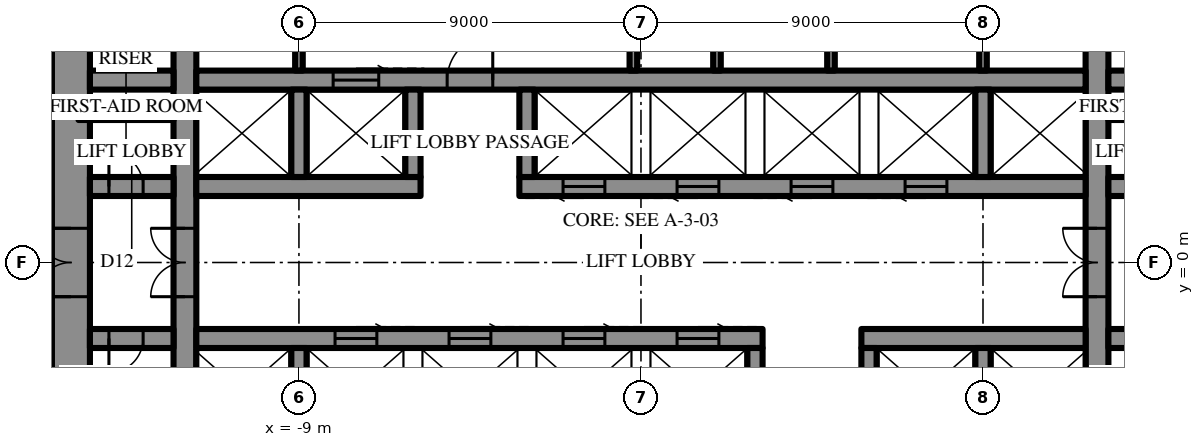
"""IFC4 building model, lengths in metres.
Left out: names, types, materials, properties, quantities, classifications, styles, units other than length and angle.
Written with IfcOpenShell. Run it as: python <this file> out.ifc"""

import sys

from ifc_helpers import new_model, si_unit, direction, frame, frame_2d, origin, place, context, subcontext, project, spatial, rectangle, extrude, element, fill, save


model = new_model("IFC4")
c1 = context("Model", 3, precision=1e-05, world=origin(), true_north=direction((0.0, 1.0)))
c2 = subcontext(c1, "Body", "Model", "MODEL_VIEW")
j1 = project(units=[si_unit("LENGTHUNIT", "METRE"), si_unit("PLANEANGLEUNIT", "RADIAN")], contexts=[c1])
p1 = place(None, origin())
s1 = spatial("IfcSite", under=j1, at=p1, CompositionType="ELEMENT")
p2 = place(p1, origin())
s2 = spatial("IfcBuilding", under=s1, at=p2, CompositionType="ELEMENT")
p3 = place(p2, frame((0.0, 0.0, 215.5)))
s3 = spatial("IfcBuildingStorey", under=s2, at=p3, CompositionType="ELEMENT", Elevation=215.5)
p4 = place(p3, frame((-15.0, 10.7, 0.0), z_axis=(0.0, 0.0, 1.0), x_axis=(0.0, -1.0, 0.0)))
e1 = element("IfcWall", 1, at=p4, inside=s3, PredefinedType="SHEAR", context=c2, shape_type="SweptSolid", body=[
    extrude(rectangle(XDim=21.4, YDim=1.0, at=frame_2d((10.7, 0.0))), origin(), (0.0, 0.0, 1.0), 4.2),
])
p5 = place(p4, frame((9.8, 0.0, 0.0)))
e2 = element("IfcOpeningElement", 2, at=p5, cuts=e1, PredefinedType="OPENING", context=c2, shape_type="SweptSolid", body=[
    extrude(rectangle(XDim=1.8, YDim=2.4, at=frame_2d((0.9, 1.2))), frame((0.0, 0.51, 0.0), z_axis=(0.0, -1.0, 0.0), x_axis=(1.0, 0.0, 0.0)), (0.0, 0.0, 1.0), 1.02),
])
p6 = place(p3, frame((12.0, -10.7, 0.0), z_axis=(0.0, 0.0, 1.0), x_axis=(0.0, 1.0, 0.0)))
e3 = element("IfcWall", 3, at=p6, inside=s3, PredefinedType="SHEAR", context=c2, shape_type="SweptSolid", body=[
    extrude(rectangle(XDim=21.4, YDim=0.6, at=frame_2d((10.7, 0.0))), origin(), (0.0, 0.0, 1.0), 4.2),
])
p7 = place(p6, frame((9.8, 0.0, 0.0)))
e4 = element("IfcOpeningElement", 4, at=p7, cuts=e3, PredefinedType="OPENING", context=c2, shape_type="SweptSolid", body=[
    extrude(rectangle(XDim=1.8, YDim=2.4, at=frame_2d((0.9, 1.2))), frame((0.0, 0.31, 0.0), z_axis=(0.0, -1.0, 0.0), x_axis=(1.0, 0.0, 0.0)), (0.0, 0.0, 1.0), 0.62),
])
p8 = place(p3, frame((-12.0, -10.7, 0.0), z_axis=(0.0, 0.0, 1.0), x_axis=(0.0, 1.0, 0.0)))
e5 = element("IfcWall", 5, at=p8, inside=s3, PredefinedType="SHEAR", context=c2, shape_type="SweptSolid", body=[
    extrude(rectangle(XDim=21.4, YDim=0.6, at=frame_2d((10.7, 0.0))), origin(), (0.0, 0.0, 1.0), 4.2),
])
p9 = place(p8, frame((9.8, 0.0, 0.0)))
e6 = element("IfcOpeningElement", 6, at=p9, cuts=e5, PredefinedType="OPENING", context=c2, shape_type="SweptSolid", body=[
    extrude(rectangle(XDim=1.8, YDim=2.4, at=frame_2d((0.9, 1.2))), frame((0.0, 0.31, 0.0), z_axis=(0.0, -1.0, 0.0), x_axis=(1.0, 0.0, 0.0)), (0.0, 0.0, 1.0), 0.62),
])
p10 = place(p3, frame((-14.5, 2.0, 0.0), z_axis=(0.0, 0.0, 1.0), x_axis=(1.0, 0.0, 0.0)))
e7 = element("IfcWall", 7, at=p10, inside=s3, PredefinedType="SHEAR", context=c2, shape_type="SweptSolid", body=[
    extrude(rectangle(XDim=2.2, YDim=0.5, at=frame_2d((1.1, 0.0))), origin(), (0.0, 0.0, 1.0), 4.2),
])
p11 = place(p10, frame((0.5, 0.0, 0.0)))
e8 = element("IfcOpeningElement", 8, at=p11, cuts=e7, PredefinedType="OPENING", context=c2, shape_type="SweptSolid", body=[
    extrude(rectangle(XDim=0.9, YDim=2.2, at=frame_2d((0.45, 1.1))), frame((0.0, 0.26, 0.0), z_axis=(0.0, -1.0, 0.0), x_axis=(1.0, 0.0, 0.0)), (0.0, 0.0, 1.0), 0.52),
])
p12 = place(p3, frame((-11.7, 2.0, 0.0), z_axis=(0.0, 0.0, 1.0), x_axis=(1.0, 0.0, 0.0)))
e9 = element("IfcWall", 9, at=p12, inside=s3, PredefinedType="SHEAR", context=c2, shape_type="SweptSolid", body=[
    extrude(rectangle(XDim=5.9, YDim=0.5, at=frame_2d((2.95, 0.0))), origin(), (0.0, 0.0, 1.0), 4.2),
])
p13 = place(p3, frame((-3.2, 2.0, 0.0), z_axis=(0.0, 0.0, 1.0), x_axis=(1.0, 0.0, 0.0)))
e10 = element("IfcWall", 10, at=p13, inside=s3, PredefinedType="SHEAR", context=c2, shape_type="SweptSolid", body=[
    extrude(rectangle(XDim=14.9, YDim=0.5, at=frame_2d((7.45, 0.0))), origin(), (0.0, 0.0, 1.0), 4.2),
])
p14 = place(p13, frame((1.15, 0.0, 0.0)))
e11 = element("IfcOpeningElement", 11, at=p14, cuts=e10, PredefinedType="OPENING", context=c2, shape_type="SweptSolid", body=[
    extrude(rectangle(XDim=1.1, YDim=2.2, at=frame_2d((0.55, 1.1))), frame((0.0, 0.26, 0.0), z_axis=(0.0, -1.0, 0.0), x_axis=(1.0, 0.0, 0.0)), (0.0, 0.0, 1.0), 0.52),
])
p15 = place(p13, frame((4.15, 0.0, 0.0)))
e12 = element("IfcOpeningElement", 12, at=p15, cuts=e10, PredefinedType="OPENING", context=c2, shape_type="SweptSolid", body=[
    extrude(rectangle(XDim=1.1, YDim=2.2, at=frame_2d((0.55, 1.1))), frame((0.0, 0.26, 0.0), z_axis=(0.0, -1.0, 0.0), x_axis=(1.0, 0.0, 0.0)), (0.0, 0.0, 1.0), 0.52),
])
p16 = place(p13, frame((7.15, 0.0, 0.0)))
e13 = element("IfcOpeningElement", 13, at=p16, cuts=e10, PredefinedType="OPENING", context=c2, shape_type="SweptSolid", body=[
    extrude(rectangle(XDim=1.1, YDim=2.2, at=frame_2d((0.55, 1.1))), frame((0.0, 0.26, 0.0), z_axis=(0.0, -1.0, 0.0), x_axis=(1.0, 0.0, 0.0)), (0.0, 0.0, 1.0), 0.52),
])
p17 = place(p13, frame((10.15, 0.0, 0.0)))
e14 = element("IfcOpeningElement", 14, at=p17, cuts=e10, PredefinedType="OPENING", context=c2, shape_type="SweptSolid", body=[
    extrude(rectangle(XDim=1.1, YDim=2.2, at=frame_2d((0.55, 1.1))), frame((0.0, 0.26, 0.0), z_axis=(0.0, -1.0, 0.0), x_axis=(1.0, 0.0, 0.0)), (0.0, 0.0, 1.0), 0.52),
])
p18 = place(p3, frame((12.3, 2.0, 0.0), z_axis=(0.0, 0.0, 1.0), x_axis=(1.0, 0.0, 0.0)))
e15 = element("IfcWall", 15, at=p18, inside=s3, PredefinedType="SHEAR", context=c2, shape_type="SweptSolid", body=[
    extrude(rectangle(XDim=2.2, YDim=0.5, at=frame_2d((1.1, 0.0))), origin(), (0.0, 0.0, 1.0), 4.2),
])
p19 = place(p18, frame((0.8, 0.0, 0.0)))
e16 = element("IfcOpeningElement", 16, at=p19, cuts=e15, PredefinedType="OPENING", context=c2, shape_type="SweptSolid", body=[
    extrude(rectangle(XDim=0.9, YDim=2.2, at=frame_2d((0.45, 1.1))), frame((0.0, 0.26, 0.0), z_axis=(0.0, -1.0, 0.0), x_axis=(1.0, 0.0, 0.0)), (0.0, 0.0, 1.0), 0.52),
])
p20 = place(p3, frame((-14.5, 4.8, 0.0), z_axis=(0.0, 0.0, 1.0), x_axis=(1.0, 0.0, 0.0)))
e17 = element("IfcWall", 17, at=p20, inside=s3, PredefinedType="SHEAR", context=c2, shape_type="SweptSolid", body=[
    extrude(rectangle(XDim=2.2, YDim=0.5, at=frame_2d((1.1, 0.0))), origin(), (0.0, 0.0, 1.0), 4.2),
])
p21 = place(p3, frame((-11.7, 4.8, 0.0), z_axis=(0.0, 0.0, 1.0), x_axis=(1.0, 0.0, 0.0)))
e18 = element("IfcWall", 18, at=p21, inside=s3, PredefinedType="SHEAR", context=c2, shape_type="SweptSolid", body=[
    extrude(rectangle(XDim=23.4, YDim=0.5, at=frame_2d((11.7, 0.0))), origin(), (0.0, 0.0, 1.0), 4.2),
])
p22 = place(p21, frame((6.6, 0.0, 0.0)))
e19 = element("IfcOpeningElement", 19, at=p22, cuts=e18, PredefinedType="OPENING", context=c2, shape_type="SweptSolid", body=[
    extrude(rectangle(XDim=1.2, YDim=2.2, at=frame_2d((0.6, 1.1))), frame((0.0, 0.26, 0.0), z_axis=(0.0, -1.0, 0.0), x_axis=(1.0, 0.0, 0.0)), (0.0, 0.0, 1.0), 0.52),
])
p23 = place(p21, frame((3.6, 0.0, 0.0)))
e20 = element("IfcOpeningElement", 20, at=p23, cuts=e18, PredefinedType="OPENING", context=c2, shape_type="SweptSolid", body=[
    extrude(rectangle(XDim=1.2, YDim=2.2, at=frame_2d((0.6, 1.1))), frame((0.0, 0.26, 0.0), z_axis=(0.0, -1.0, 0.0), x_axis=(1.0, 0.0, 0.0)), (0.0, 0.0, 1.0), 0.52),
])
p24 = place(p3, frame((12.3, 4.8, 0.0), z_axis=(0.0, 0.0, 1.0), x_axis=(1.0, 0.0, 0.0)))
e21 = element("IfcWall", 21, at=p24, inside=s3, PredefinedType="SHEAR", context=c2, shape_type="SweptSolid", body=[
    extrude(rectangle(XDim=2.2, YDim=0.5, at=frame_2d((1.1, 0.0))), origin(), (0.0, 0.0, 1.0), 4.2),
])
for number, where, z_axis, x_axis in (
    (22, (-9.0, 2.25, 0.0), (0.0, 0.0, 1.0), (0.0, 1.0, 0.0)),
    (23, (-6.0, 2.25, 0.0), (0.0, 0.0, 1.0), (0.0, 1.0, 0.0)),
    (24, (-3.0, 2.25, 0.0), (0.0, 0.0, 1.0), (0.0, 1.0, 0.0)),
    (25, (9.0, 2.25, 0.0), (0.0, 0.0, 1.0), (0.0, 1.0, 0.0)),
):
    element("IfcWall", number, at=place(p3, frame(where, z_axis=z_axis, x_axis=x_axis)), inside=s3, PredefinedType="SHEAR", context=c2, shape_type="SweptSolid", body=[
        extrude(rectangle(XDim=2.3, YDim=0.4, at=frame_2d((1.15, 0.0))), origin(), (0.0, 0.0, 1.0), 4.2),
    ])
p25 = place(p3, frame((-0.2, 5.05, 0.0), z_axis=(0.0, 0.0, 1.0), x_axis=(0.0, 1.0, 0.0)))
e26 = element("IfcWall", 26, at=p25, inside=s3, PredefinedType="SHEAR", context=c2, shape_type="SweptSolid", body=[
    extrude(rectangle(XDim=5.65, YDim=0.2, at=frame_2d((2.825, 0.0))), origin(), (0.0, 0.0, 1.0), 4.2),
])
p26 = place(p3, frame((14.5, -2.0, 0.0), z_axis=(0.0, 0.0, 1.0), x_axis=(-1.0, 0.0, 0.0)))
e27 = element("IfcWall", 27, at=p26, inside=s3, PredefinedType="SHEAR", context=c2, shape_type="SweptSolid", body=[
    extrude(rectangle(XDim=2.2, YDim=0.5, at=frame_2d((1.1, 0.0))), origin(), (0.0, 0.0, 1.0), 4.2),
])
p27 = place(p26, frame((0.5, 0.0, 0.0)))
e28 = element("IfcOpeningElement", 28, at=p27, cuts=e27, PredefinedType="OPENING", context=c2, shape_type="SweptSolid", body=[
    extrude(rectangle(XDim=0.9, YDim=2.2, at=frame_2d((0.45, 1.1))), frame((0.0, 0.26, 0.0), z_axis=(0.0, -1.0, 0.0), x_axis=(1.0, 0.0, 0.0)), (0.0, 0.0, 1.0), 0.52),
])
p28 = place(p3, frame((11.7, -2.0, 0.0), z_axis=(0.0, 0.0, 1.0), x_axis=(-1.0, 0.0, 0.0)))
e29 = element("IfcWall", 29, at=p28, inside=s3, PredefinedType="SHEAR", context=c2, shape_type="SweptSolid", body=[
    extrude(rectangle(XDim=5.9, YDim=0.5, at=frame_2d((2.95, 0.0))), origin(), (0.0, 0.0, 1.0), 4.2),
])
p29 = place(p3, frame((3.2, -2.0, 0.0), z_axis=(0.0, 0.0, 1.0), x_axis=(-1.0, 0.0, 0.0)))
e30 = element("IfcWall", 30, at=p29, inside=s3, PredefinedType="SHEAR", context=c2, shape_type="SweptSolid", body=[
    extrude(rectangle(XDim=14.9, YDim=0.5, at=frame_2d((7.45, 0.0))), origin(), (0.0, 0.0, 1.0), 4.2),
])
p30 = place(p29, frame((1.15, 0.0, 0.0)))
e31 = element("IfcOpeningElement", 31, at=p30, cuts=e30, PredefinedType="OPENING", context=c2, shape_type="SweptSolid", body=[
    extrude(rectangle(XDim=1.1, YDim=2.2, at=frame_2d((0.55, 1.1))), frame((0.0, 0.26, 0.0), z_axis=(0.0, -1.0, 0.0), x_axis=(1.0, 0.0, 0.0)), (0.0, 0.0, 1.0), 0.52),
])
p31 = place(p29, frame((4.15, 0.0, 0.0)))
e32 = element("IfcOpeningElement", 32, at=p31, cuts=e30, PredefinedType="OPENING", context=c2, shape_type="SweptSolid", body=[
    extrude(rectangle(XDim=1.1, YDim=2.2, at=frame_2d((0.55, 1.1))), frame((0.0, 0.26, 0.0), z_axis=(0.0, -1.0, 0.0), x_axis=(1.0, 0.0, 0.0)), (0.0, 0.0, 1.0), 0.52),
])
p32 = place(p29, frame((7.15, 0.0, 0.0)))
e33 = element("IfcOpeningElement", 33, at=p32, cuts=e30, PredefinedType="OPENING", context=c2, shape_type="SweptSolid", body=[
    extrude(rectangle(XDim=1.1, YDim=2.2, at=frame_2d((0.55, 1.1))), frame((0.0, 0.26, 0.0), z_axis=(0.0, -1.0, 0.0), x_axis=(1.0, 0.0, 0.0)), (0.0, 0.0, 1.0), 0.52),
])
p33 = place(p29, frame((10.15, 0.0, 0.0)))
e34 = element("IfcOpeningElement", 34, at=p33, cuts=e30, PredefinedType="OPENING", context=c2, shape_type="SweptSolid", body=[
    extrude(rectangle(XDim=1.1, YDim=2.2, at=frame_2d((0.55, 1.1))), frame((0.0, 0.26, 0.0), z_axis=(0.0, -1.0, 0.0), x_axis=(1.0, 0.0, 0.0)), (0.0, 0.0, 1.0), 0.52),
])
p34 = place(p3, frame((-12.3, -2.0, 0.0), z_axis=(0.0, 0.0, 1.0), x_axis=(-1.0, 0.0, 0.0)))
e35 = element("IfcWall", 35, at=p34, inside=s3, PredefinedType="SHEAR", context=c2, shape_type="SweptSolid", body=[
    extrude(rectangle(XDim=2.2, YDim=0.5, at=frame_2d((1.1, 0.0))), origin(), (0.0, 0.0, 1.0), 4.2),
])
p35 = place(p34, frame((0.8, 0.0, 0.0)))
e36 = element("IfcOpeningElement", 36, at=p35, cuts=e35, PredefinedType="OPENING", context=c2, shape_type="SweptSolid", body=[
    extrude(rectangle(XDim=0.9, YDim=2.2, at=frame_2d((0.45, 1.1))), frame((0.0, 0.26, 0.0), z_axis=(0.0, -1.0, 0.0), x_axis=(1.0, 0.0, 0.0)), (0.0, 0.0, 1.0), 0.52),
])
for number, where, z_axis, x_axis in (
    (37, (9.0, -2.25, 0.0), (0.0, 0.0, 1.0), (0.0, -1.0, 0.0)),
    (38, (6.0, -2.25, 0.0), (0.0, 0.0, 1.0), (0.0, -1.0, 0.0)),
    (39, (3.0, -2.25, 0.0), (0.0, 0.0, 1.0), (0.0, -1.0, 0.0)),
    (40, (-9.0, -2.25, 0.0), (0.0, 0.0, 1.0), (0.0, -1.0, 0.0)),
):
    element("IfcWall", number, at=place(p3, frame(where, z_axis=z_axis, x_axis=x_axis)), inside=s3, PredefinedType="SHEAR", context=c2, shape_type="SweptSolid", body=[
        extrude(rectangle(XDim=2.3, YDim=0.4, at=frame_2d((1.15, 0.0))), origin(), (0.0, 0.0, 1.0), 4.2),
    ])
for number, where, z_axis, x_axis in (
    (41, (-9.0, 5.05, 0.0), (0.0, 0.0, 1.0), (0.0, 1.0, 0.0)),
    (42, (9.0, 5.05, 0.0), (0.0, 0.0, 1.0), (0.0, 1.0, 0.0)),
    (43, (2.0, 5.05, 0.0), (0.0, 0.0, 1.0), (0.0, 1.0, 0.0)),
    (44, (5.0, 5.05, 0.0), (0.0, 0.0, 1.0), (0.0, 1.0, 0.0)),
):
    element("IfcWall", number, at=place(p3, frame(where, z_axis=z_axis, x_axis=x_axis)), inside=s3, PredefinedType="PARTITIONING", context=c2, shape_type="SweptSolid", body=[
        extrude(rectangle(XDim=5.65, YDim=0.2, at=frame_2d((2.825, 0.0))), origin(), (0.0, 0.0, 1.0), 4.0),
    ])
for number, where, z_axis, x_axis in (
    (45, (-14.8, 3.85, 0.0), (0.0, 0.0, 1.0), (1.0, 0.0, 0.0)),
    (46, (12.3, 3.85, 0.0), (0.0, 0.0, 1.0), (1.0, 0.0, 0.0)),
):
    element("IfcWall", number, at=place(p3, frame(where, z_axis=z_axis, x_axis=x_axis)), inside=s3, PredefinedType="PARTITIONING", context=c2, shape_type="SweptSolid", body=[
        extrude(rectangle(XDim=2.5, YDim=0.2, at=frame_2d((1.25, 0.0))), origin(), (0.0, 0.0, 1.0), 4.0),
    ])
p36 = place(p5, frame((1.8, 0.0, 0.0), z_axis=(0.0, 0.0, 1.0), x_axis=(-1.0, 0.0, 0.0)))
e47 = element("IfcDoor", 47, at=p36, inside=s3, OperationType="DOUBLE_DOOR_SINGLE_SWING", PredefinedType="DOOR", context=c2, shape_type="SweptSolid", body=[
    extrude(rectangle(XDim=1.8, YDim=2.4, at=frame_2d((0.9, 1.2))), frame((0.0, 0.025, 0.0), z_axis=(0.0, -1.0, 0.0), x_axis=(1.0, 0.0, 0.0)), (0.0, 0.0, 1.0), 0.05),
])
fill(e2, e47)
p37 = place(p22, origin())
e48 = element("IfcDoor", 48, at=p37, inside=s3, OperationType="SINGLE_SWING_LEFT", PredefinedType="DOOR", context=c2, shape_type="SweptSolid", body=[
    extrude(rectangle(XDim=1.2, YDim=2.2, at=frame_2d((0.6, 1.1))), frame((0.0, 0.025, 0.0), z_axis=(0.0, -1.0, 0.0), x_axis=(1.0, 0.0, 0.0)), (0.0, 0.0, 1.0), 0.05),
])
fill(e19, e48)
p38 = place(p11, origin())
e49 = element("IfcDoor", 49, at=p38, inside=s3, OperationType="SINGLE_SWING_RIGHT", PredefinedType="DOOR", context=c2, shape_type="SweptSolid", body=[
    extrude(rectangle(XDim=0.9, YDim=2.2, at=frame_2d((0.45, 1.1))), frame((0.0, 0.025, 0.0), z_axis=(0.0, -1.0, 0.0), x_axis=(1.0, 0.0, 0.0)), (0.0, 0.0, 1.0), 0.05),
])
fill(e8, e49)
p39 = place(p35, origin())
e50 = element("IfcDoor", 50, at=p39, inside=s3, OperationType="SINGLE_SWING_LEFT", PredefinedType="DOOR", context=c2, shape_type="SweptSolid", body=[
    extrude(rectangle(XDim=0.9, YDim=2.2, at=frame_2d((0.45, 1.1))), frame((0.0, 0.025, 0.0), z_axis=(0.0, -1.0, 0.0), x_axis=(1.0, 0.0, 0.0)), (0.0, 0.0, 1.0), 0.05),
])
fill(e36, e50)
p40 = place(p7, origin())
e51 = element("IfcDoor", 51, at=p40, inside=s3, OperationType="DOUBLE_DOOR_SINGLE_SWING", PredefinedType="DOOR", context=c2, shape_type="SweptSolid", body=[
    extrude(rectangle(XDim=1.8, YDim=2.4, at=frame_2d((0.9, 1.2))), frame((0.0, 0.025, 0.0), z_axis=(0.0, -1.0, 0.0), x_axis=(1.0, 0.0, 0.0)), (0.0, 0.0, 1.0), 0.05),
])
fill(e4, e51)
p41 = place(p9, origin())
e52 = element("IfcDoor", 52, at=p41, inside=s3, OperationType="DOUBLE_DOOR_SINGLE_SWING", PredefinedType="DOOR", context=c2, shape_type="SweptSolid", body=[
    extrude(rectangle(XDim=1.8, YDim=2.4, at=frame_2d((0.9, 1.2))), frame((0.0, 0.025, 0.0), z_axis=(0.0, -1.0, 0.0), x_axis=(1.0, 0.0, 0.0)), (0.0, 0.0, 1.0), 0.05),
])
fill(e6, e52)
p42 = place(p23, origin())
e53 = element("IfcDoor", 53, at=p42, inside=s3, OperationType="SLIDING_TO_LEFT", PredefinedType="DOOR", context=c2, shape_type="SweptSolid", body=[
    extrude(rectangle(XDim=1.2, YDim=2.2, at=frame_2d((0.6, 1.1))), frame((0.0, 0.025, 0.0), z_axis=(0.0, -1.0, 0.0), x_axis=(1.0, 0.0, 0.0)), (0.0, 0.0, 1.0), 0.05),
])
fill(e20, e53)
p43 = place(p14, frame((1.1, 0.0, 0.0), z_axis=(0.0, 0.0, 1.0), x_axis=(-1.0, 0.0, 0.0)))
e54 = element("IfcDoor", 54, at=p43, inside=s3, OperationType="SLIDING_TO_LEFT", PredefinedType="DOOR", context=c2, shape_type="SweptSolid", body=[
    extrude(rectangle(XDim=1.1, YDim=2.2, at=frame_2d((0.55, 1.1))), frame((0.0, 0.025, 0.0), z_axis=(0.0, -1.0, 0.0), x_axis=(1.0, 0.0, 0.0)), (0.0, 0.0, 1.0), 0.05),
])
fill(e11, e54)
p44 = place(p15, frame((1.1, 0.0, 0.0), z_axis=(0.0, 0.0, 1.0), x_axis=(-1.0, 0.0, 0.0)))
e55 = element("IfcDoor", 55, at=p44, inside=s3, OperationType="SLIDING_TO_LEFT", PredefinedType="DOOR", context=c2, shape_type="SweptSolid", body=[
    extrude(rectangle(XDim=1.1, YDim=2.2, at=frame_2d((0.55, 1.1))), frame((0.0, 0.025, 0.0), z_axis=(0.0, -1.0, 0.0), x_axis=(1.0, 0.0, 0.0)), (0.0, 0.0, 1.0), 0.05),
])
fill(e12, e55)
p45 = place(p16, frame((1.1, 0.0, 0.0), z_axis=(0.0, 0.0, 1.0), x_axis=(-1.0, 0.0, 0.0)))
e56 = element("IfcDoor", 56, at=p45, inside=s3, OperationType="SLIDING_TO_LEFT", PredefinedType="DOOR", context=c2, shape_type="SweptSolid", body=[
    extrude(rectangle(XDim=1.1, YDim=2.2, at=frame_2d((0.55, 1.1))), frame((0.0, 0.025, 0.0), z_axis=(0.0, -1.0, 0.0), x_axis=(1.0, 0.0, 0.0)), (0.0, 0.0, 1.0), 0.05),
])
fill(e13, e56)
p46 = place(p17, frame((1.1, 0.0, 0.0), z_axis=(0.0, 0.0, 1.0), x_axis=(-1.0, 0.0, 0.0)))
e57 = element("IfcDoor", 57, at=p46, inside=s3, OperationType="SLIDING_TO_LEFT", PredefinedType="DOOR", context=c2, shape_type="SweptSolid", body=[
    extrude(rectangle(XDim=1.1, YDim=2.2, at=frame_2d((0.55, 1.1))), frame((0.0, 0.025, 0.0), z_axis=(0.0, -1.0, 0.0), x_axis=(1.0, 0.0, 0.0)), (0.0, 0.0, 1.0), 0.05),
])
fill(e14, e57)
p47 = place(p30, frame((1.1, 0.0, 0.0), z_axis=(0.0, 0.0, 1.0), x_axis=(-1.0, 0.0, 0.0)))
e58 = element("IfcDoor", 58, at=p47, inside=s3, OperationType="SLIDING_TO_LEFT", PredefinedType="DOOR", context=c2, shape_type="SweptSolid", body=[
    extrude(rectangle(XDim=1.1, YDim=2.2, at=frame_2d((0.55, 1.1))), frame((0.0, 0.025, 0.0), z_axis=(0.0, -1.0, 0.0), x_axis=(1.0, 0.0, 0.0)), (0.0, 0.0, 1.0), 0.05),
])
fill(e31, e58)
p48 = place(p31, frame((1.1, 0.0, 0.0), z_axis=(0.0, 0.0, 1.0), x_axis=(-1.0, 0.0, 0.0)))
e59 = element("IfcDoor", 59, at=p48, inside=s3, OperationType="SLIDING_TO_LEFT", PredefinedType="DOOR", context=c2, shape_type="SweptSolid", body=[
    extrude(rectangle(XDim=1.1, YDim=2.2, at=frame_2d((0.55, 1.1))), frame((0.0, 0.025, 0.0), z_axis=(0.0, -1.0, 0.0), x_axis=(1.0, 0.0, 0.0)), (0.0, 0.0, 1.0), 0.05),
])
fill(e32, e59)
p49 = place(p32, frame((1.1, 0.0, 0.0), z_axis=(0.0, 0.0, 1.0), x_axis=(-1.0, 0.0, 0.0)))
e60 = element("IfcDoor", 60, at=p49, inside=s3, OperationType="SLIDING_TO_LEFT", PredefinedType="DOOR", context=c2, shape_type="SweptSolid", body=[
    extrude(rectangle(XDim=1.1, YDim=2.2, at=frame_2d((0.55, 1.1))), frame((0.0, 0.025, 0.0), z_axis=(0.0, -1.0, 0.0), x_axis=(1.0, 0.0, 0.0)), (0.0, 0.0, 1.0), 0.05),
])
fill(e33, e60)
p50 = place(p33, frame((1.1, 0.0, 0.0), z_axis=(0.0, 0.0, 1.0), x_axis=(-1.0, 0.0, 0.0)))
e61 = element("IfcDoor", 61, at=p50, inside=s3, OperationType="SLIDING_TO_LEFT", PredefinedType="DOOR", context=c2, shape_type="SweptSolid", body=[
    extrude(rectangle(XDim=1.1, YDim=2.2, at=frame_2d((0.55, 1.1))), frame((0.0, 0.025, 0.0), z_axis=(0.0, -1.0, 0.0), x_axis=(1.0, 0.0, 0.0)), (0.0, 0.0, 1.0), 0.05),
])
fill(e34, e61)
save(model, sys.argv[1])
